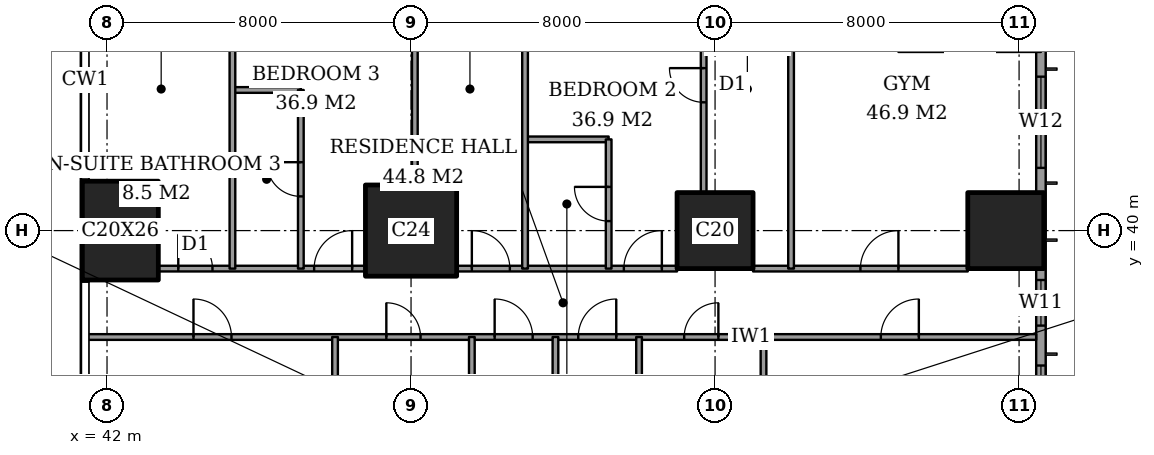
"""IFC4 building model, lengths in metres.
Left out: names, types, materials, properties, quantities, classifications, styles, units other than length and angle.
Written with IfcOpenShell. Run it as: python <this file> out.ifc"""

import sys

from ifc_helpers import new_model, si_unit, direction, frame, frame_2d, origin, origin_2d, place, context, subcontext, project, spatial, rectangle, extrude, element, fill, save


model = new_model("IFC4")
c1 = context("Model", 3, precision=1e-05, world=origin(), true_north=direction((0.0, 1.0)))
c2 = subcontext(c1, "Body", "Model", "MODEL_VIEW")
j1 = project(units=[si_unit("LENGTHUNIT", "METRE"), si_unit("PLANEANGLEUNIT", "RADIAN")], contexts=[c1])
p1 = place(None, origin())
s1 = spatial("IfcSite", under=j1, at=p1, CompositionType="ELEMENT")
p2 = place(p1, origin())
s2 = spatial("IfcBuilding", under=s1, at=p2, CompositionType="ELEMENT")
p3 = place(p2, frame((0.0, 0.0, 146.6)))
s3 = spatial("IfcBuildingStorey", under=s2, at=p3, CompositionType="ELEMENT", Elevation=146.6)
p4 = place(p3, frame((42.35, 40.0, 0.0), z_axis=(0.0, 0.0, 1.0), x_axis=(1.0, 0.0, 0.0)))
e1 = element("IfcColumn", 1, at=p4, inside=s3, PredefinedType="COLUMN", context=c2, shape_type="SweptSolid", body=[
    extrude(rectangle(XDim=2.0, YDim=2.6, at=origin_2d()), origin(), (0.0, 0.0, 1.0), 3.6),
])
p5 = place(p3, frame((50.0, 40.0, 0.0), z_axis=(0.0, 0.0, 1.0), x_axis=(1.0, 0.0, 0.0)))
e2 = element("IfcColumn", 2, at=p5, inside=s3, PredefinedType="COLUMN", context=c2, shape_type="SweptSolid", body=[
    extrude(rectangle(XDim=2.4, YDim=2.4, at=origin_2d()), origin(), (0.0, 0.0, 1.0), 3.6),
])
for number, where, z_axis, x_axis in (
    (3, (58.0, 40.0, 0.0), (0.0, 0.0, 1.0), (1.0, 0.0, 0.0)),
    (4, (65.65, 40.0, 0.0), (0.0, 0.0, 1.0), (1.0, 0.0, 0.0)),
):
    element("IfcColumn", number, at=place(p3, frame(where, z_axis=z_axis, x_axis=x_axis)), inside=s3, PredefinedType="COLUMN", context=c2, shape_type="SweptSolid", body=[
        extrude(rectangle(XDim=2.0, YDim=2.0, at=origin_2d()), origin(), (0.0, 0.0, 1.0), 3.6),
    ])
p6 = place(p3, frame((66.575, 3.175, 0.0), z_axis=(0.0, 0.0, 1.0), x_axis=(0.0, 1.0, 0.0)))
e5 = element("IfcWall", 5, at=p6, inside=s3, PredefinedType="SOLIDWALL", context=c2, shape_type="SweptSolid", body=[
    extrude(rectangle(XDim=41.65, YDim=0.25, at=frame_2d((20.825, 0.0))), origin(), (0.0, 0.0, 1.0), 3.6),
])
p7 = place(p6, frame((0.775, 0.0, 0.4)))
e6 = element("IfcOpeningElement", 6, at=p7, cuts=e5, PredefinedType="OPENING", context=c2, shape_type="SweptSolid", body=[
    extrude(rectangle(XDim=2.4, YDim=2.2, at=frame_2d((1.2, 1.1))), frame((0.0, 0.135, 0.0), z_axis=(0.0, -1.0, 0.0), x_axis=(1.0, 0.0, 0.0)), (0.0, 0.0, 1.0), 0.27),
])
p8 = place(p6, frame((6.1, 0.0, 0.4)))
e7 = element("IfcOpeningElement", 7, at=p8, cuts=e5, PredefinedType="OPENING", context=c2, shape_type="SweptSolid", body=[
    extrude(rectangle(XDim=1.2, YDim=2.2, at=frame_2d((0.6, 1.1))), frame((0.0, 0.135, 0.0), z_axis=(0.0, -1.0, 0.0), x_axis=(1.0, 0.0, 0.0)), (0.0, 0.0, 1.0), 0.27),
])
p9 = place(p6, frame((8.275, 0.0, 0.4)))
e8 = element("IfcOpeningElement", 8, at=p9, cuts=e5, PredefinedType="OPENING", context=c2, shape_type="SweptSolid", body=[
    extrude(rectangle(XDim=2.4, YDim=2.2, at=frame_2d((1.2, 1.1))), frame((0.0, 0.135, 0.0), z_axis=(0.0, -1.0, 0.0), x_axis=(1.0, 0.0, 0.0)), (0.0, 0.0, 1.0), 0.27),
])
p10 = place(p6, frame((15.775, 0.0, 0.4)))
e9 = element("IfcOpeningElement", 9, at=p10, cuts=e5, PredefinedType="OPENING", context=c2, shape_type="SweptSolid", body=[
    extrude(rectangle(XDim=2.4, YDim=2.2, at=frame_2d((1.2, 1.1))), frame((0.0, 0.135, 0.0), z_axis=(0.0, -1.0, 0.0), x_axis=(1.0, 0.0, 0.0)), (0.0, 0.0, 1.0), 0.27),
])
p11 = place(p6, frame((23.475, 0.0, 0.4)))
e10 = element("IfcOpeningElement", 10, at=p11, cuts=e5, PredefinedType="OPENING", context=c2, shape_type="SweptSolid", body=[
    extrude(rectangle(XDim=2.4, YDim=2.2, at=frame_2d((1.2, 1.1))), frame((0.0, 0.135, 0.0), z_axis=(0.0, -1.0, 0.0), x_axis=(1.0, 0.0, 0.0)), (0.0, 0.0, 1.0), 0.27),
])
p12 = place(p6, frame((30.875, 0.0, 0.4)))
e11 = element("IfcOpeningElement", 11, at=p12, cuts=e5, PredefinedType="OPENING", context=c2, shape_type="SweptSolid", body=[
    extrude(rectangle(XDim=2.4, YDim=2.2, at=frame_2d((1.2, 1.1))), frame((0.0, 0.135, 0.0), z_axis=(0.0, -1.0, 0.0), x_axis=(1.0, 0.0, 0.0)), (0.0, 0.0, 1.0), 0.27),
])
p13 = place(p6, frame((34.325, 0.0, 0.4)))
e12 = element("IfcOpeningElement", 12, at=p13, cuts=e5, PredefinedType="OPENING", context=c2, shape_type="SweptSolid", body=[
    extrude(rectangle(XDim=1.2, YDim=2.2, at=frame_2d((0.6, 1.1))), frame((0.0, 0.135, 0.0), z_axis=(0.0, -1.0, 0.0), x_axis=(1.0, 0.0, 0.0)), (0.0, 0.0, 1.0), 0.27),
])
p14 = place(p6, frame((38.475, 0.0, 0.4)))
e13 = element("IfcOpeningElement", 13, at=p14, cuts=e5, PredefinedType="OPENING", context=c2, shape_type="SweptSolid", body=[
    extrude(rectangle(XDim=2.4, YDim=2.2, at=frame_2d((1.2, 1.1))), frame((0.0, 0.135, 0.0), z_axis=(0.0, -1.0, 0.0), x_axis=(1.0, 0.0, 0.0)), (0.0, 0.0, 1.0), 0.27),
])
p15 = place(p3, frame((41.439, 37.2, 0.0), z_axis=(0.0, 0.0, 1.0), x_axis=(1.0, 0.0, 0.0)))
e14 = element("IfcWall", 14, at=p15, inside=s3, PredefinedType="PARTITIONING", context=c2, shape_type="SweptSolid", body=[
    extrude(rectangle(XDim=25.011, YDim=0.15, at=frame_2d((12.505, 0.0))), origin(), (0.0, 0.0, 1.0), 3.35),
])
p16 = place(p15, frame((10.761, 0.0, 0.0)))
e15 = element("IfcOpeningElement", 15, at=p16, cuts=e14, PredefinedType="OPENING", context=c2, shape_type="SweptSolid", body=[
    extrude(rectangle(XDim=1.0, YDim=2.1, at=frame_2d((0.5, 1.05))), frame((0.0, 0.085, 0.0), z_axis=(0.0, -1.0, 0.0), x_axis=(1.0, 0.0, 0.0)), (0.0, 0.0, 1.0), 0.17),
])
p17 = place(p15, frame((20.924, 0.0, 0.0)))
e16 = element("IfcOpeningElement", 16, at=p17, cuts=e14, PredefinedType="OPENING", context=c2, shape_type="SweptSolid", body=[
    extrude(rectangle(XDim=1.0, YDim=2.1, at=frame_2d((0.5, 1.05))), frame((0.0, 0.085, 0.0), z_axis=(0.0, -1.0, 0.0), x_axis=(1.0, 0.0, 0.0)), (0.0, 0.0, 1.0), 0.17),
])
p18 = place(p15, frame((15.749, 0.0, 0.0)))
e17 = element("IfcOpeningElement", 17, at=p18, cuts=e14, PredefinedType="OPENING", context=c2, shape_type="SweptSolid", body=[
    extrude(rectangle(XDim=0.9, YDim=2.1, at=frame_2d((0.45, 1.05))), frame((0.0, 0.085, 0.0), z_axis=(0.0, -1.0, 0.0), x_axis=(1.0, 0.0, 0.0)), (0.0, 0.0, 1.0), 0.17),
])
p19 = place(p15, frame((12.961, 0.0, 0.0)))
e18 = element("IfcOpeningElement", 18, at=p19, cuts=e14, PredefinedType="OPENING", context=c2, shape_type="SweptSolid", body=[
    extrude(rectangle(XDim=1.0, YDim=2.1, at=frame_2d((0.5, 1.05))), frame((0.0, 0.085, 0.0), z_axis=(0.0, -1.0, 0.0), x_axis=(1.0, 0.0, 0.0)), (0.0, 0.0, 1.0), 0.17),
])
p20 = place(p15, frame((7.911, 0.0, 0.0)))
e19 = element("IfcOpeningElement", 19, at=p20, cuts=e14, PredefinedType="OPENING", context=c2, shape_type="SweptSolid", body=[
    extrude(rectangle(XDim=0.9, YDim=2.1, at=frame_2d((0.45, 1.05))), frame((0.0, 0.085, 0.0), z_axis=(0.0, -1.0, 0.0), x_axis=(1.0, 0.0, 0.0)), (0.0, 0.0, 1.0), 0.17),
])
p21 = place(p15, frame((2.836, 0.0, 0.0)))
e20 = element("IfcOpeningElement", 20, at=p21, cuts=e14, PredefinedType="OPENING", context=c2, shape_type="SweptSolid", body=[
    extrude(rectangle(XDim=1.0, YDim=2.1, at=frame_2d((0.5, 1.05))), frame((0.0, 0.085, 0.0), z_axis=(0.0, -1.0, 0.0), x_axis=(1.0, 0.0, 0.0)), (0.0, 0.0, 1.0), 0.17),
])
p22 = place(p3, frame((43.35, 39.0, 0.0), z_axis=(0.0, 0.0, 1.0), x_axis=(1.0, 0.0, 0.0)))
e21 = element("IfcWall", 21, at=p22, inside=s3, PredefinedType="PARTITIONING", context=c2, shape_type="SweptSolid", body=[
    extrude(rectangle(XDim=5.45, YDim=0.15, at=frame_2d((2.725, 0.0))), origin(), (0.0, 0.0, 1.0), 3.35),
])
p23 = place(p22, frame((4.1, 0.0, 0.0)))
e22 = element("IfcOpeningElement", 22, at=p23, cuts=e21, PredefinedType="OPENING", context=c2, shape_type="SweptSolid", body=[
    extrude(rectangle(XDim=1.0, YDim=2.1, at=frame_2d((0.5, 1.05))), frame((0.0, 0.085, 0.0), z_axis=(0.0, -1.0, 0.0), x_axis=(1.0, 0.0, 0.0)), (0.0, 0.0, 1.0), 0.17),
])
p24 = place(p22, frame((0.525, 0.0, 0.0)))
e23 = element("IfcOpeningElement", 23, at=p24, cuts=e21, PredefinedType="OPENING", context=c2, shape_type="SweptSolid", body=[
    extrude(rectangle(XDim=0.9, YDim=2.1, at=frame_2d((0.45, 1.05))), frame((0.0, 0.085, 0.0), z_axis=(0.0, -1.0, 0.0), x_axis=(1.0, 0.0, 0.0)), (0.0, 0.0, 1.0), 0.17),
])
p25 = place(p3, frame((51.2, 39.0, 0.0), z_axis=(0.0, 0.0, 1.0), x_axis=(1.0, 0.0, 0.0)))
e24 = element("IfcWall", 24, at=p25, inside=s3, PredefinedType="PARTITIONING", context=c2, shape_type="SweptSolid", body=[
    extrude(rectangle(XDim=5.8, YDim=0.15, at=frame_2d((2.9, 0.0))), origin(), (0.0, 0.0, 1.0), 3.35),
])
p26 = place(p25, frame((4.4, 0.0, 0.0)))
e25 = element("IfcOpeningElement", 25, at=p26, cuts=e24, PredefinedType="OPENING", context=c2, shape_type="SweptSolid", body=[
    extrude(rectangle(XDim=1.0, YDim=2.1, at=frame_2d((0.5, 1.05))), frame((0.0, 0.085, 0.0), z_axis=(0.0, -1.0, 0.0), x_axis=(1.0, 0.0, 0.0)), (0.0, 0.0, 1.0), 0.17),
])
p27 = place(p25, frame((0.4, 0.0, 0.0)))
e26 = element("IfcOpeningElement", 26, at=p27, cuts=e24, PredefinedType="OPENING", context=c2, shape_type="SweptSolid", body=[
    extrude(rectangle(XDim=1.0, YDim=2.1, at=frame_2d((0.5, 1.05))), frame((0.0, 0.085, 0.0), z_axis=(0.0, -1.0, 0.0), x_axis=(1.0, 0.0, 0.0)), (0.0, 0.0, 1.0), 0.17),
])
p28 = place(p3, frame((59.0, 39.0, 0.0), z_axis=(0.0, 0.0, 1.0), x_axis=(1.0, 0.0, 0.0)))
e27 = element("IfcWall", 27, at=p28, inside=s3, PredefinedType="PARTITIONING", context=c2, shape_type="SweptSolid", body=[
    extrude(rectangle(XDim=5.65, YDim=0.15, at=frame_2d((2.825, 0.0))), origin(), (0.0, 0.0, 1.0), 3.35),
])
p29 = place(p28, frame((2.825, 0.0, 0.0)))
e28 = element("IfcOpeningElement", 28, at=p29, cuts=e27, PredefinedType="OPENING", context=c2, shape_type="SweptSolid", body=[
    extrude(rectangle(XDim=1.0, YDim=2.1, at=frame_2d((0.5, 1.05))), frame((0.0, 0.085, 0.0), z_axis=(0.0, -1.0, 0.0), x_axis=(1.0, 0.0, 0.0)), (0.0, 0.0, 1.0), 0.17),
])
p30 = place(p3, frame((53.0, 42.4, 0.0), z_axis=(0.0, 0.0, 1.0), x_axis=(1.0, 0.0, 0.0)))
e29 = element("IfcWall", 29, at=p30, inside=s3, PredefinedType="PARTITIONING", context=c2, shape_type="SweptSolid", body=[
    extrude(rectangle(XDim=2.2, YDim=0.15, at=frame_2d((1.1, 0.0))), origin(), (0.0, 0.0, 1.0), 3.35),
])
p31 = place(p3, frame((45.3, 43.7, 0.0), z_axis=(0.0, 0.0, 1.0), x_axis=(1.0, 0.0, 0.0)))
e30 = element("IfcWall", 30, at=p31, inside=s3, PredefinedType="PARTITIONING", context=c2, shape_type="SweptSolid", body=[
    extrude(rectangle(XDim=1.8, YDim=0.15, at=frame_2d((0.9, 0.0))), origin(), (0.0, 0.0, 1.0), 3.35),
])
p32 = place(p3, frame((45.3, 39.0, 0.0), z_axis=(0.0, 0.0, 1.0), x_axis=(0.0, 1.0, 0.0)))
e31 = element("IfcWall", 31, at=p32, inside=s3, PredefinedType="PARTITIONING", context=c2, shape_type="SweptSolid", body=[
    extrude(rectangle(XDim=9.45, YDim=0.15, at=frame_2d((4.725, 0.0))), origin(), (0.0, 0.0, 1.0), 3.35),
])
p33 = place(p3, frame((47.1, 39.0, 0.0), z_axis=(0.0, 0.0, 1.0), x_axis=(0.0, 1.0, 0.0)))
e32 = element("IfcWall", 32, at=p33, inside=s3, PredefinedType="PARTITIONING", context=c2, shape_type="SweptSolid", body=[
    extrude(rectangle(XDim=4.7, YDim=0.15, at=frame_2d((2.35, 0.0))), origin(), (0.0, 0.0, 1.0), 3.35),
])
p34 = place(p33, frame((1.9, 0.0, 0.0)))
e33 = element("IfcOpeningElement", 33, at=p34, cuts=e32, PredefinedType="OPENING", context=c2, shape_type="SweptSolid", body=[
    extrude(rectangle(XDim=0.9, YDim=2.1, at=frame_2d((0.45, 1.05))), frame((0.0, 0.085, 0.0), z_axis=(0.0, -1.0, 0.0), x_axis=(1.0, 0.0, 0.0)), (0.0, 0.0, 1.0), 0.17),
])
p35 = place(p3, frame((48.0, 28.0, 0.0), z_axis=(0.0, 0.0, 1.0), x_axis=(0.0, 1.0, 0.0)))
e34 = element("IfcWall", 34, at=p35, inside=s3, PredefinedType="PARTITIONING", context=c2, shape_type="SweptSolid", body=[
    extrude(rectangle(XDim=9.2, YDim=0.15, at=frame_2d((4.6, 0.0))), origin(), (0.0, 0.0, 1.0), 3.35),
])
p36 = place(p35, frame((0.5, 0.0, 0.0)))
e35 = element("IfcOpeningElement", 35, at=p36, cuts=e34, PredefinedType="OPENING", context=c2, shape_type="SweptSolid", body=[
    extrude(rectangle(XDim=1.0, YDim=2.1, at=frame_2d((0.5, 1.05))), frame((0.0, 0.085, 0.0), z_axis=(0.0, -1.0, 0.0), x_axis=(1.0, 0.0, 0.0)), (0.0, 0.0, 1.0), 0.17),
])
p37 = place(p3, frame((50.1, 41.2, 0.0), z_axis=(0.0, 0.0, 1.0), x_axis=(0.0, 1.0, 0.0)))
e36 = element("IfcWall", 36, at=p37, inside=s3, PredefinedType="PARTITIONING", context=c2, shape_type="SweptSolid", body=[
    extrude(rectangle(XDim=5.45, YDim=0.15, at=frame_2d((2.725, 0.0))), origin(), (0.0, 0.0, 1.0), 3.35),
])
p38 = place(p3, frame((51.6, 30.0, 0.0), z_axis=(0.0, 0.0, 1.0), x_axis=(0.0, 1.0, 0.0)))
e37 = element("IfcWall", 37, at=p38, inside=s3, PredefinedType="PARTITIONING", context=c2, shape_type="SweptSolid", body=[
    extrude(rectangle(XDim=7.2, YDim=0.15, at=frame_2d((3.6, 0.0))), origin(), (0.0, 0.0, 1.0), 3.35),
])
p39 = place(p3, frame((53.0, 39.0, 0.0), z_axis=(0.0, 0.0, 1.0), x_axis=(0.0, 1.0, 0.0)))
e38 = element("IfcWall", 38, at=p39, inside=s3, PredefinedType="PARTITIONING", context=c2, shape_type="SweptSolid", body=[
    extrude(rectangle(XDim=9.45, YDim=0.15, at=frame_2d((4.725, 0.0))), origin(), (0.0, 0.0, 1.0), 3.35),
])
p40 = place(p3, frame((53.8, 30.0, 0.0), z_axis=(0.0, 0.0, 1.0), x_axis=(0.0, 1.0, 0.0)))
e39 = element("IfcWall", 39, at=p40, inside=s3, PredefinedType="PARTITIONING", context=c2, shape_type="SweptSolid", body=[
    extrude(rectangle(XDim=7.2, YDim=0.15, at=frame_2d((3.6, 0.0))), origin(), (0.0, 0.0, 1.0), 3.35),
])
p41 = place(p3, frame((55.2, 39.0, 0.0), z_axis=(0.0, 0.0, 1.0), x_axis=(0.0, 1.0, 0.0)))
e40 = element("IfcWall", 40, at=p41, inside=s3, PredefinedType="PARTITIONING", context=c2, shape_type="SweptSolid", body=[
    extrude(rectangle(XDim=3.4, YDim=0.15, at=frame_2d((1.7, 0.0))), origin(), (0.0, 0.0, 1.0), 3.35),
])
p42 = place(p41, frame((1.25, 0.0, 0.0)))
e41 = element("IfcOpeningElement", 41, at=p42, cuts=e40, PredefinedType="OPENING", context=c2, shape_type="SweptSolid", body=[
    extrude(rectangle(XDim=0.9, YDim=2.1, at=frame_2d((0.45, 1.05))), frame((0.0, 0.085, 0.0), z_axis=(0.0, -1.0, 0.0), x_axis=(1.0, 0.0, 0.0)), (0.0, 0.0, 1.0), 0.17),
])
p43 = place(p3, frame((56.0, 28.0, 0.0), z_axis=(0.0, 0.0, 1.0), x_axis=(0.0, 1.0, 0.0)))
e42 = element("IfcWall", 42, at=p43, inside=s3, PredefinedType="PARTITIONING", context=c2, shape_type="SweptSolid", body=[
    extrude(rectangle(XDim=9.2, YDim=0.15, at=frame_2d((4.6, 0.0))), origin(), (0.0, 0.0, 1.0), 3.35),
])
p44 = place(p43, frame((0.5, 0.0, 0.0)))
e43 = element("IfcOpeningElement", 43, at=p44, cuts=e42, PredefinedType="OPENING", context=c2, shape_type="SweptSolid", body=[
    extrude(rectangle(XDim=1.0, YDim=2.1, at=frame_2d((0.5, 1.05))), frame((0.0, 0.085, 0.0), z_axis=(0.0, -1.0, 0.0), x_axis=(1.0, 0.0, 0.0)), (0.0, 0.0, 1.0), 0.17),
])
p45 = place(p3, frame((57.7, 41.0, 0.0), z_axis=(0.0, 0.0, 1.0), x_axis=(0.0, 1.0, 0.0)))
e44 = element("IfcWall", 44, at=p45, inside=s3, PredefinedType="PARTITIONING", context=c2, shape_type="SweptSolid", body=[
    extrude(rectangle(XDim=5.65, YDim=0.15, at=frame_2d((2.825, 0.0))), origin(), (0.0, 0.0, 1.0), 3.35),
])
p46 = place(p45, frame((2.375, 0.0, 0.0)))
e45 = element("IfcOpeningElement", 45, at=p46, cuts=e44, PredefinedType="OPENING", context=c2, shape_type="SweptSolid", body=[
    extrude(rectangle(XDim=0.9, YDim=2.1, at=frame_2d((0.45, 1.05))), frame((0.0, 0.085, 0.0), z_axis=(0.0, -1.0, 0.0), x_axis=(1.0, 0.0, 0.0)), (0.0, 0.0, 1.0), 0.17),
])
p47 = place(p3, frame((59.275, 33.2, 0.0), z_axis=(0.0, 0.0, 1.0), x_axis=(0.0, 1.0, 0.0)))
e46 = element("IfcWall", 46, at=p47, inside=s3, PredefinedType="PARTITIONING", context=c2, shape_type="SweptSolid", body=[
    extrude(rectangle(XDim=4.0, YDim=0.15, at=frame_2d((2.0, 0.0))), origin(), (0.0, 0.0, 1.0), 3.35),
])
p48 = place(p3, frame((60.0, 39.0, 0.0), z_axis=(0.0, 0.0, 1.0), x_axis=(0.0, 1.0, 0.0)))
e47 = element("IfcWall", 47, at=p48, inside=s3, PredefinedType="PARTITIONING", context=c2, shape_type="SweptSolid", body=[
    extrude(rectangle(XDim=9.45, YDim=0.15, at=frame_2d((4.725, 0.0))), origin(), (0.0, 0.0, 1.0), 3.35),
])
p49 = place(p12, origin())
e48 = element("IfcWindow", 48, at=p49, inside=s3, PartitioningType="SINGLE_PANEL", PredefinedType="WINDOW", context=c2, shape_type="SweptSolid", body=[
    extrude(rectangle(XDim=2.4, YDim=2.2, at=frame_2d((1.2, 1.1))), frame((0.0, 0.03, 0.0), z_axis=(0.0, -1.0, 0.0), x_axis=(1.0, 0.0, 0.0)), (0.0, 0.0, 1.0), 0.06),
])
fill(e11, e48)
p50 = place(p13, origin())
e49 = element("IfcWindow", 49, at=p50, inside=s3, PartitioningType="SINGLE_PANEL", PredefinedType="WINDOW", context=c2, shape_type="SweptSolid", body=[
    extrude(rectangle(XDim=1.2, YDim=2.2, at=frame_2d((0.6, 1.1))), frame((0.0, 0.03, 0.0), z_axis=(0.0, -1.0, 0.0), x_axis=(1.0, 0.0, 0.0)), (0.0, 0.0, 1.0), 0.06),
])
fill(e12, e49)
p51 = place(p14, origin())
e50 = element("IfcWindow", 50, at=p51, inside=s3, PartitioningType="SINGLE_PANEL", PredefinedType="WINDOW", context=c2, shape_type="SweptSolid", body=[
    extrude(rectangle(XDim=2.4, YDim=2.2, at=frame_2d((1.2, 1.1))), frame((0.0, 0.03, 0.0), z_axis=(0.0, -1.0, 0.0), x_axis=(1.0, 0.0, 0.0)), (0.0, 0.0, 1.0), 0.06),
])
fill(e13, e50)
p52 = place(p29, origin())
e51 = element("IfcDoor", 51, at=p52, inside=s3, OperationType="SINGLE_SWING_LEFT", PredefinedType="DOOR", context=c2, shape_type="SweptSolid", body=[
    extrude(rectangle(XDim=1.0, YDim=2.1, at=frame_2d((0.5, 1.05))), frame((0.0, 0.025, 0.0), z_axis=(0.0, -1.0, 0.0), x_axis=(1.0, 0.0, 0.0)), (0.0, 0.0, 1.0), 0.05),
])
fill(e28, e51)
p53 = place(p46, origin())
e52 = element("IfcDoor", 52, at=p53, inside=s3, OperationType="SINGLE_SWING_LEFT", PredefinedType="DOOR", context=c2, shape_type="SweptSolid", body=[
    extrude(rectangle(XDim=0.9, YDim=2.1, at=frame_2d((0.45, 1.05))), frame((0.0, 0.025, 0.0), z_axis=(0.0, -1.0, 0.0), x_axis=(1.0, 0.0, 0.0)), (0.0, 0.0, 1.0), 0.05),
])
fill(e45, e52)
p54 = place(p42, origin())
e53 = element("IfcDoor", 53, at=p54, inside=s3, OperationType="SINGLE_SWING_LEFT", PredefinedType="DOOR", context=c2, shape_type="SweptSolid", body=[
    extrude(rectangle(XDim=0.9, YDim=2.1, at=frame_2d((0.45, 1.05))), frame((0.0, 0.025, 0.0), z_axis=(0.0, -1.0, 0.0), x_axis=(1.0, 0.0, 0.0)), (0.0, 0.0, 1.0), 0.05),
])
fill(e41, e53)
p55 = place(p26, origin())
e54 = element("IfcDoor", 54, at=p55, inside=s3, OperationType="SINGLE_SWING_LEFT", PredefinedType="DOOR", context=c2, shape_type="SweptSolid", body=[
    extrude(rectangle(XDim=1.0, YDim=2.1, at=frame_2d((0.5, 1.05))), frame((0.0, 0.025, 0.0), z_axis=(0.0, -1.0, 0.0), x_axis=(1.0, 0.0, 0.0)), (0.0, 0.0, 1.0), 0.05),
])
fill(e25, e54)
p56 = place(p27, origin())
e55 = element("IfcDoor", 55, at=p56, inside=s3, OperationType="SINGLE_SWING_RIGHT", PredefinedType="DOOR", context=c2, shape_type="SweptSolid", body=[
    extrude(rectangle(XDim=1.0, YDim=2.1, at=frame_2d((0.5, 1.05))), frame((0.0, 0.025, 0.0), z_axis=(0.0, -1.0, 0.0), x_axis=(1.0, 0.0, 0.0)), (0.0, 0.0, 1.0), 0.05),
])
fill(e26, e55)
p57 = place(p34, origin())
e56 = element("IfcDoor", 56, at=p57, inside=s3, OperationType="SINGLE_SWING_LEFT", PredefinedType="DOOR", context=c2, shape_type="SweptSolid", body=[
    extrude(rectangle(XDim=0.9, YDim=2.1, at=frame_2d((0.45, 1.05))), frame((0.0, 0.025, 0.0), z_axis=(0.0, -1.0, 0.0), x_axis=(1.0, 0.0, 0.0)), (0.0, 0.0, 1.0), 0.05),
])
fill(e33, e56)
p58 = place(p23, origin())
e57 = element("IfcDoor", 57, at=p58, inside=s3, OperationType="SINGLE_SWING_LEFT", PredefinedType="DOOR", context=c2, shape_type="SweptSolid", body=[
    extrude(rectangle(XDim=1.0, YDim=2.1, at=frame_2d((0.5, 1.05))), frame((0.0, 0.025, 0.0), z_axis=(0.0, -1.0, 0.0), x_axis=(1.0, 0.0, 0.0)), (0.0, 0.0, 1.0), 0.05),
])
fill(e22, e57)
p59 = place(p24, origin())
e58 = element("IfcDoor", 58, at=p59, inside=s3, OperationType="SINGLE_SWING_RIGHT", PredefinedType="DOOR", context=c2, shape_type="SweptSolid", body=[
    extrude(rectangle(XDim=0.9, YDim=2.1, at=frame_2d((0.45, 1.05))), frame((0.0, 0.025, 0.0), z_axis=(0.0, -1.0, 0.0), x_axis=(1.0, 0.0, 0.0)), (0.0, 0.0, 1.0), 0.05),
])
fill(e23, e58)
p60 = place(p16, origin())
e59 = element("IfcDoor", 59, at=p60, inside=s3, OperationType="SINGLE_SWING_RIGHT", PredefinedType="DOOR", context=c2, shape_type="SweptSolid", body=[
    extrude(rectangle(XDim=1.0, YDim=2.1, at=frame_2d((0.5, 1.05))), frame((0.0, 0.025, 0.0), z_axis=(0.0, -1.0, 0.0), x_axis=(1.0, 0.0, 0.0)), (0.0, 0.0, 1.0), 0.05),
])
fill(e15, e59)
p61 = place(p17, origin())
e60 = element("IfcDoor", 60, at=p61, inside=s3, OperationType="SINGLE_SWING_LEFT", PredefinedType="DOOR", context=c2, shape_type="SweptSolid", body=[
    extrude(rectangle(XDim=1.0, YDim=2.1, at=frame_2d((0.5, 1.05))), frame((0.0, 0.025, 0.0), z_axis=(0.0, -1.0, 0.0), x_axis=(1.0, 0.0, 0.0)), (0.0, 0.0, 1.0), 0.05),
])
fill(e16, e60)
p62 = place(p18, origin())
e61 = element("IfcDoor", 61, at=p62, inside=s3, OperationType="SINGLE_SWING_LEFT", PredefinedType="DOOR", context=c2, shape_type="SweptSolid", body=[
    extrude(rectangle(XDim=0.9, YDim=2.1, at=frame_2d((0.45, 1.05))), frame((0.0, 0.025, 0.0), z_axis=(0.0, -1.0, 0.0), x_axis=(1.0, 0.0, 0.0)), (0.0, 0.0, 1.0), 0.05),
])
fill(e17, e61)
p63 = place(p19, origin())
e62 = element("IfcDoor", 62, at=p63, inside=s3, OperationType="SINGLE_SWING_LEFT", PredefinedType="DOOR", context=c2, shape_type="SweptSolid", body=[
    extrude(rectangle(XDim=1.0, YDim=2.1, at=frame_2d((0.5, 1.05))), frame((0.0, 0.025, 0.0), z_axis=(0.0, -1.0, 0.0), x_axis=(1.0, 0.0, 0.0)), (0.0, 0.0, 1.0), 0.05),
])
fill(e18, e62)
p64 = place(p20, origin())
e63 = element("IfcDoor", 63, at=p64, inside=s3, OperationType="SINGLE_SWING_RIGHT", PredefinedType="DOOR", context=c2, shape_type="SweptSolid", body=[
    extrude(rectangle(XDim=0.9, YDim=2.1, at=frame_2d((0.45, 1.05))), frame((0.0, 0.025, 0.0), z_axis=(0.0, -1.0, 0.0), x_axis=(1.0, 0.0, 0.0)), (0.0, 0.0, 1.0), 0.05),
])
fill(e19, e63)
p65 = place(p21, origin())
e64 = element("IfcDoor", 64, at=p65, inside=s3, OperationType="SINGLE_SWING_RIGHT", PredefinedType="DOOR", context=c2, shape_type="SweptSolid", body=[
    extrude(rectangle(XDim=1.0, YDim=2.1, at=frame_2d((0.5, 1.05))), frame((0.0, 0.025, 0.0), z_axis=(0.0, -1.0, 0.0), x_axis=(1.0, 0.0, 0.0)), (0.0, 0.0, 1.0), 0.05),
])
fill(e20, e64)
save(model, sys.argv[1])
